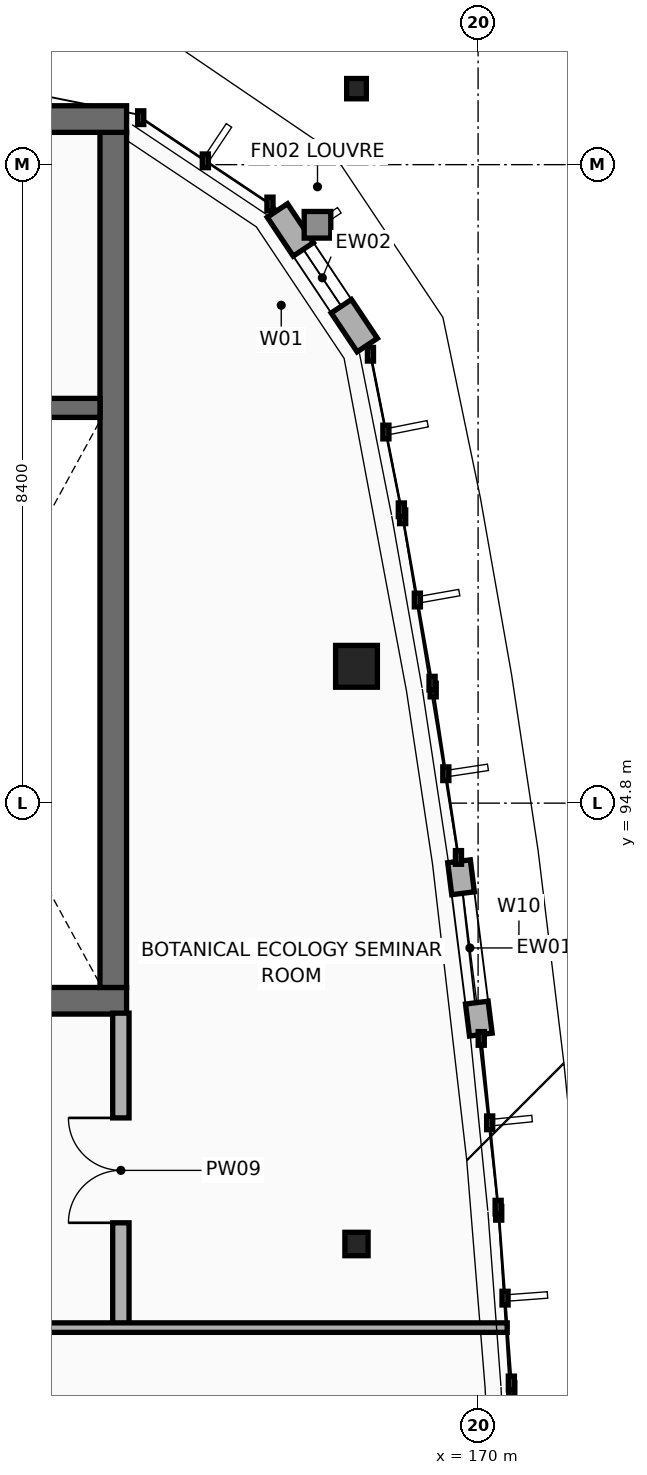
"""IFC4 building model, lengths in metres.
Left out: names, types, materials, properties, quantities, classifications, styles, units other than length and angle.
Written with IfcOpenShell. Run it as: python <this file> out.ifc"""

import sys

from ifc_helpers import new_model, si_unit, direction, frame, frame_2d, origin, origin_2d, place, context, subcontext, project, spatial, rectangle, i_section, extrude, element, fill, save


model = new_model("IFC4")
c1 = context("Model", 3, precision=1e-05, world=origin(), true_north=direction((0.0, 1.0)))
c2 = subcontext(c1, "Body", "Model", "MODEL_VIEW")
j1 = project(units=[si_unit("LENGTHUNIT", "METRE"), si_unit("PLANEANGLEUNIT", "RADIAN")], contexts=[c1])
p1 = place(None, origin())
s1 = spatial("IfcSite", under=j1, at=p1, CompositionType="ELEMENT")
p2 = place(p1, origin())
s2 = spatial("IfcBuilding", under=s1, at=p2, CompositionType="ELEMENT")
p3 = place(p2, frame((0.0, 0.0, 19.8)))
s3 = spatial("IfcBuildingStorey", under=s2, at=p3, CompositionType="ELEMENT", Elevation=19.8)
p4 = place(p3, frame((160.625, 92.2, 0.0), z_axis=(0.0, 0.0, 1.0), x_axis=(1.0, 0.0, 0.0)))
e1 = element("IfcWall", 1, at=p4, inside=s3, PredefinedType="SHEAR", context=c2, shape_type="SweptSolid", body=[
    extrude(rectangle(XDim=4.75, YDim=0.35, at=frame_2d((2.375, 0.0))), origin(), (0.0, 0.0, 1.0), 3.6),
])
p5 = place(p3, frame((165.2, 92.375, 0.0), z_axis=(0.0, 0.0, 1.0), x_axis=(0.0, 1.0, 0.0)))
e2 = element("IfcWall", 2, at=p5, inside=s3, PredefinedType="SHEAR", context=c2, shape_type="SweptSolid", body=[
    extrude(rectangle(XDim=11.25, YDim=0.35, at=frame_2d((5.625, 0.0))), origin(), (0.0, 0.0, 1.0), 3.6),
])
p6 = place(p3, frame((165.375, 103.8, 0.0), z_axis=(0.0, 0.0, 1.0), x_axis=(-1.0, 0.0, 0.0)))
e3 = element("IfcWall", 3, at=p6, inside=s3, PredefinedType="SHEAR", context=c2, shape_type="SweptSolid", body=[
    extrude(rectangle(XDim=4.75, YDim=0.35, at=frame_2d((2.375, 0.0))), origin(), (0.0, 0.0, 1.0), 3.6),
])
p7 = place(p3, frame((160.975, 100.0, 0.0), z_axis=(0.0, 0.0, 1.0), x_axis=(1.0, 0.0, 0.0)))
e4 = element("IfcWall", 4, at=p7, inside=s3, PredefinedType="SHEAR", context=c2, shape_type="SweptSolid", body=[
    extrude(rectangle(XDim=4.05, YDim=0.25, at=frame_2d((2.025, 0.0))), origin(), (0.0, 0.0, 1.0), 3.6),
])
p8 = place(p3, frame((168.4, 89.0, 0.0), z_axis=(0.0, 0.0, 1.0), x_axis=(1.0, 0.0, 0.0)))
e5 = element("IfcColumn", 5, at=p8, inside=s3, PredefinedType="COLUMN", context=c2, shape_type="SweptSolid", body=[
    extrude(i_section(OverallWidth=0.305, OverallDepth=0.308, WebThickness=0.01, FlangeThickness=0.015, at=origin_2d()), origin(), (0.0, 0.0, 1.0), 3.6),
])
p9 = place(p3, frame((168.4, 96.6, 0.0), z_axis=(0.0, 0.0, 1.0), x_axis=(1.0, 0.0, 0.0)))
e6 = element("IfcColumn", 6, at=p9, inside=s3, PredefinedType="COLUMN", context=c2, shape_type="SweptSolid", body=[
    extrude(rectangle(XDim=0.55, YDim=0.55, at=origin_2d()), origin(), (0.0, 0.0, 1.0), 3.6),
])
p10 = place(p3, frame((168.4, 104.2, 0.0), z_axis=(0.0, 0.0, 1.0), x_axis=(1.0, 0.0, 0.0)))
e7 = element("IfcColumn", 7, at=p10, inside=s3, PredefinedType="COLUMN", context=c2, shape_type="SweptSolid", body=[
    extrude(i_section(OverallWidth=0.259, OverallDepth=0.267, WebThickness=0.013, FlangeThickness=0.021, at=origin_2d()), origin(), (0.0, 0.0, 1.0), 3.6),
])
p11 = place(p3, frame((169.749, 94.035, 0.0), z_axis=(0.0, 0.0, 1.0), x_axis=(0.124832313753, -0.992177853735, 0.0)))
e8 = element("IfcWall", 8, at=p11, inside=s3, PredefinedType="STANDARD", context=c2, shape_type="SweptSolid", body=[
    extrude(rectangle(XDim=2.298, YDim=0.3, at=frame_2d((1.149, 0.0))), origin(), (0.0, 0.0, 1.0), 3.364),
])
p12 = place(p11, frame((0.424, 0.0, 0.9)))
e9 = element("IfcOpeningElement", 9, at=p12, cuts=e8, PredefinedType="OPENING", context=c2, shape_type="SweptSolid", body=[
    extrude(rectangle(XDim=1.45, YDim=1.8, at=frame_2d((0.725, 0.9))), frame((0.0, 0.16, 0.0), z_axis=(0.0, -1.0, 0.0), x_axis=(1.0, 0.0, 0.0)), (0.0, 0.0, 1.0), 0.32),
])
p13 = place(p3, frame((167.359, 102.597, 0.0), z_axis=(0.0, 0.0, 1.0), x_axis=(0.555493531305, -0.831520857633, 0.0)))
e10 = element("IfcWall", 10, at=p13, inside=s3, PredefinedType="STANDARD", context=c2, shape_type="SweptSolid", body=[
    extrude(rectangle(XDim=2.13, YDim=0.32, at=frame_2d((1.065, 0.0))), origin(), (0.0, 0.0, 1.0), 2.84),
])
p14 = place(p13, frame((0.615, 0.0, 0.9)))
e11 = element("IfcOpeningElement", 11, at=p14, cuts=e10, PredefinedType="OPENING", context=c2, shape_type="SweptSolid", body=[
    extrude(rectangle(XDim=0.9, YDim=1.2, at=frame_2d((0.45, 0.6))), frame((0.0, 0.17, 0.0), z_axis=(0.0, -1.0, 0.0), x_axis=(1.0, 0.0, 0.0)), (0.0, 0.0, 1.0), 0.34),
])
p15 = place(p3, frame((165.3, 87.9, 0.0), z_axis=(0.0, 0.0, 1.0), x_axis=(0.0, 1.0, 0.0)))
e12 = element("IfcWall", 12, at=p15, inside=s3, PredefinedType="PARTITIONING", context=c2, shape_type="SweptSolid", body=[
    extrude(rectangle(XDim=4.137, YDim=0.215, at=frame_2d((2.069, 0.0))), origin(), (0.0, 0.0, 1.0), 2.625),
])
p16 = place(p15, frame((1.379, 0.0, 0.0)))
e13 = element("IfcOpeningElement", 13, at=p16, cuts=e12, PredefinedType="OPENING", context=c2, shape_type="SweptSolid", body=[
    extrude(rectangle(XDim=1.38, YDim=2.2, at=frame_2d((0.69, 1.1))), frame((0.0, 0.117, 0.0), z_axis=(0.0, -1.0, 0.0), x_axis=(1.0, 0.0, 0.0)), (0.0, 0.0, 1.0), 0.235),
])
p17 = place(p3, frame((151.817, 87.9, 0.0), z_axis=(0.0, 0.0, 1.0), x_axis=(1.0, 0.0, 0.0)))
e14 = element("IfcWall", 14, at=p17, inside=s3, PredefinedType="PARTITIONING", context=c2, shape_type="SweptSolid", body=[
    extrude(rectangle(XDim=18.566, YDim=0.125, at=frame_2d((9.283, 0.0))), origin(), (0.0, 0.0, 1.0), 2.538),
])
p18 = place(p12, origin())
e15 = element("IfcWindow", 15, at=p18, inside=s3, PartitioningType="SINGLE_PANEL", PredefinedType="WINDOW", context=c2, shape_type="SweptSolid", body=[
    extrude(rectangle(XDim=1.45, YDim=1.8, at=frame_2d((0.725, 0.9))), frame((0.0, 0.03, 0.0), z_axis=(0.0, -1.0, 0.0), x_axis=(1.0, 0.0, 0.0)), (0.0, 0.0, 1.0), 0.06),
])
fill(e9, e15)
p19 = place(p14, origin())
e16 = element("IfcWindow", 16, at=p19, inside=s3, PartitioningType="SINGLE_PANEL", PredefinedType="WINDOW", context=c2, shape_type="SweptSolid", body=[
    extrude(rectangle(XDim=0.9, YDim=1.2, at=frame_2d((0.45, 0.6))), frame((0.0, 0.03, 0.0), z_axis=(0.0, -1.0, 0.0), x_axis=(1.0, 0.0, 0.0)), (0.0, 0.0, 1.0), 0.06),
])
fill(e11, e16)
p20 = place(p16, origin())
e17 = element("IfcDoor", 17, at=p20, inside=s3, OperationType="DOUBLE_DOOR_SINGLE_SWING", PredefinedType="DOOR", context=c2, shape_type="SweptSolid", body=[
    extrude(rectangle(XDim=1.38, YDim=2.2, at=frame_2d((0.69, 1.1))), frame((0.0, 0.025, 0.0), z_axis=(0.0, -1.0, 0.0), x_axis=(1.0, 0.0, 0.0)), (0.0, 0.0, 1.0), 0.05),
])
fill(e13, e17)
save(model, sys.argv[1])
